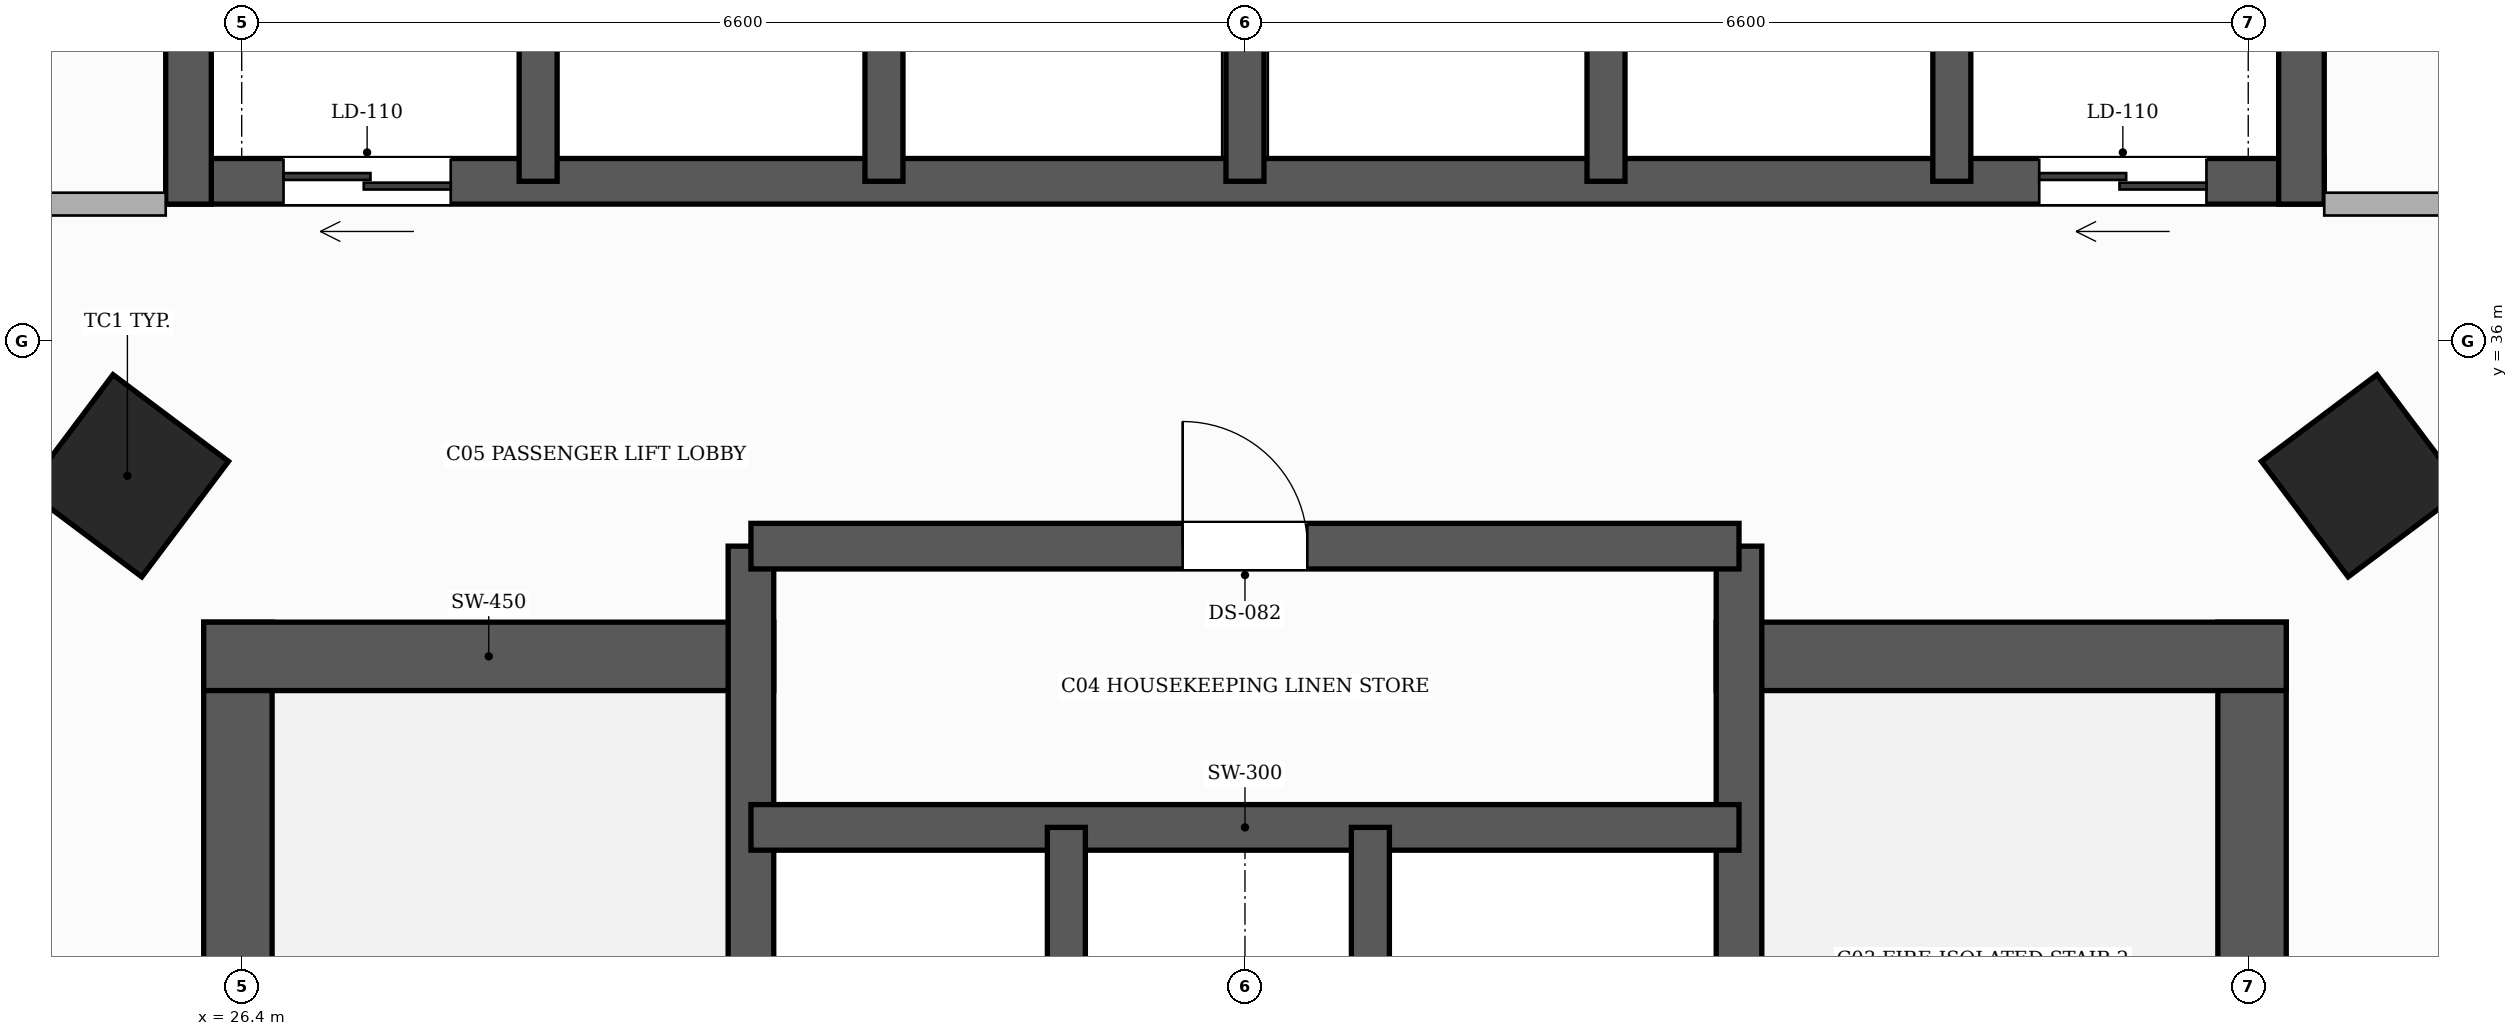
"""IFC4 building model, lengths in metres.
Left out: names, types, materials, properties, quantities, classifications, styles, units other than length and angle.
Written with IfcOpenShell. Run it as: python <this file> out.ifc"""

import sys

from ifc_helpers import new_model, si_unit, direction, frame, frame_2d, origin, origin_2d, place, context, subcontext, project, spatial, rectangle, hollow_rectangle, extrude, element, fill, save


model = new_model("IFC4")
c1 = context("Model", 3, precision=1e-05, world=origin(), true_north=direction((0.0, 1.0)))
c2 = subcontext(c1, "Body", "Model", "MODEL_VIEW")
j1 = project(units=[si_unit("LENGTHUNIT", "METRE"), si_unit("PLANEANGLEUNIT", "RADIAN")], contexts=[c1])
p1 = place(None, origin())
s1 = spatial("IfcSite", under=j1, at=p1, CompositionType="ELEMENT")
p2 = place(p1, origin())
s2 = spatial("IfcBuilding", under=s1, at=p2, CompositionType="ELEMENT")
p3 = place(p2, frame((0.0, 0.0, 23.6)))
s3 = spatial("IfcBuildingStorey", under=s2, at=p3, CompositionType="ELEMENT", Elevation=23.6)
p4 = place(p3, frame((26.375, 26.45, 0.0), z_axis=(0.0, 0.0, 1.0), x_axis=(0.0, 1.0, 0.0)))
e1 = element("IfcWall", 1, at=p4, inside=s3, PredefinedType="SHEAR", context=c2, shape_type="SweptSolid", body=[
    extrude(rectangle(XDim=7.7, YDim=0.45, at=frame_2d((3.85, 0.0))), origin(), (0.0, 0.0, 1.0), 3.3),
])
p5 = place(p3, frame((26.15, 33.925, 0.0), z_axis=(0.0, 0.0, 1.0), x_axis=(1.0, 0.0, 0.0)))
e2 = element("IfcWall", 2, at=p5, inside=s3, PredefinedType="SHEAR", context=c2, shape_type="SweptSolid", body=[
    extrude(rectangle(XDim=3.75, YDim=0.45, at=frame_2d((1.875, 0.0))), origin(), (0.0, 0.0, 1.0), 3.3),
])
p6 = place(p3, frame((39.625, 26.45, 0.0), z_axis=(0.0, 0.0, 1.0), x_axis=(0.0, 1.0, 0.0)))
e3 = element("IfcWall", 3, at=p6, inside=s3, PredefinedType="SHEAR", context=c2, shape_type="SweptSolid", body=[
    extrude(rectangle(XDim=7.7, YDim=0.45, at=frame_2d((3.85, 0.0))), origin(), (0.0, 0.0, 1.0), 3.3),
])
p7 = place(p3, frame((36.1, 33.925, 0.0), z_axis=(0.0, 0.0, 1.0), x_axis=(1.0, 0.0, 0.0)))
e4 = element("IfcWall", 4, at=p7, inside=s3, PredefinedType="SHEAR", context=c2, shape_type="SweptSolid", body=[
    extrude(rectangle(XDim=3.75, YDim=0.45, at=frame_2d((1.875, 0.0))), origin(), (0.0, 0.0, 1.0), 3.3),
])
p8 = place(p3, frame((29.75, 26.45, 0.0), z_axis=(0.0, 0.0, 1.0), x_axis=(0.0, 1.0, 0.0)))
e5 = element("IfcWall", 5, at=p8, inside=s3, PredefinedType="SHEAR", context=c2, shape_type="SweptSolid", body=[
    extrude(rectangle(XDim=8.2, YDim=0.3, at=frame_2d((4.1, 0.0))), origin(), (0.0, 0.0, 1.0), 3.3),
])
p9 = place(p8, frame((0.6, 0.0, 0.0)))
e6 = element("IfcOpeningElement", 6, at=p9, cuts=e5, PredefinedType="OPENING", context=c2, shape_type="SweptSolid", body=[
    extrude(rectangle(XDim=1.05, YDim=2.15, at=frame_2d((0.525, 1.075))), frame((0.0, 0.16, 0.0), z_axis=(0.0, -1.0, 0.0), x_axis=(1.0, 0.0, 0.0)), (0.0, 0.0, 1.0), 0.32),
])
p10 = place(p3, frame((36.25, 26.45, 0.0), z_axis=(0.0, 0.0, 1.0), x_axis=(0.0, 1.0, 0.0)))
e7 = element("IfcWall", 7, at=p10, inside=s3, PredefinedType="SHEAR", context=c2, shape_type="SweptSolid", body=[
    extrude(rectangle(XDim=8.2, YDim=0.3, at=frame_2d((4.1, 0.0))), origin(), (0.0, 0.0, 1.0), 3.3),
])
p11 = place(p10, frame((0.6, 0.0, 0.0)))
e8 = element("IfcOpeningElement", 8, at=p11, cuts=e7, PredefinedType="OPENING", context=c2, shape_type="SweptSolid", body=[
    extrude(rectangle(XDim=1.05, YDim=2.15, at=frame_2d((0.525, 1.075))), frame((0.0, 0.16, 0.0), z_axis=(0.0, -1.0, 0.0), x_axis=(1.0, 0.0, 0.0)), (0.0, 0.0, 1.0), 0.32),
])
p12 = place(p3, frame((29.75, 32.8, 0.0), z_axis=(0.0, 0.0, 1.0), x_axis=(1.0, 0.0, 0.0)))
e9 = element("IfcWall", 9, at=p12, inside=s3, PredefinedType="SHEAR", context=c2, shape_type="SweptSolid", body=[
    extrude(rectangle(XDim=6.5, YDim=0.3, at=frame_2d((3.25, 0.0))), origin(), (0.0, 0.0, 1.0), 3.3),
])
for number, where, z_axis, x_axis in (
    (10, (31.825, 29.9, 0.0), (0.0, 0.0, 1.0), (0.0, 1.0, 0.0)),
    (11, (33.825, 29.9, 0.0), (0.0, 0.0, 1.0), (0.0, 1.0, 0.0)),
):
    element("IfcWall", number, at=place(p3, frame(where, z_axis=z_axis, x_axis=x_axis)), inside=s3, PredefinedType="SHEAR", context=c2, shape_type="SweptSolid", body=[
        extrude(rectangle(XDim=2.9, YDim=0.25, at=frame_2d((1.45, 0.0))), origin(), (0.0, 0.0, 1.0), 3.3),
    ])
p13 = place(p3, frame((29.75, 34.65, 0.0), z_axis=(0.0, 0.0, 1.0), x_axis=(1.0, 0.0, 0.0)))
e12 = element("IfcWall", 12, at=p13, inside=s3, PredefinedType="SHEAR", context=c2, shape_type="SweptSolid", body=[
    extrude(rectangle(XDim=6.5, YDim=0.3, at=frame_2d((3.25, 0.0))), origin(), (0.0, 0.0, 1.0), 3.3),
])
p14 = place(p13, frame((2.84, 0.0, 0.0)))
e13 = element("IfcOpeningElement", 13, at=p14, cuts=e12, PredefinedType="OPENING", context=c2, shape_type="SweptSolid", body=[
    extrude(rectangle(XDim=0.82, YDim=2.1, at=frame_2d((0.41, 1.05))), frame((0.0, 0.16, 0.0), z_axis=(0.0, -1.0, 0.0), x_axis=(1.0, 0.0, 0.0)), (0.0, 0.0, 1.0), 0.32),
])
p15 = place(p3, frame((40.1, 37.05, 0.0), z_axis=(0.0, 0.0, 1.0), x_axis=(-1.0, 0.0, 0.0)))
e14 = element("IfcWall", 14, at=p15, inside=s3, PredefinedType="SHEAR", context=c2, shape_type="SweptSolid", body=[
    extrude(rectangle(XDim=14.2, YDim=0.3, at=frame_2d((7.1, 0.0))), origin(), (0.0, 0.0, 1.0), 3.3),
])
p16 = place(p15, frame((12.325, 0.0, 0.0)))
e15 = element("IfcOpeningElement", 15, at=p16, cuts=e14, PredefinedType="OPENING", context=c2, shape_type="SweptSolid", body=[
    extrude(rectangle(XDim=1.1, YDim=2.2, at=frame_2d((0.55, 1.1))), frame((0.0, 0.16, 0.0), z_axis=(0.0, -1.0, 0.0), x_axis=(1.0, 0.0, 0.0)), (0.0, 0.0, 1.0), 0.32),
])
p17 = place(p15, frame((0.775, 0.0, 0.0)))
e16 = element("IfcOpeningElement", 16, at=p17, cuts=e14, PredefinedType="OPENING", context=c2, shape_type="SweptSolid", body=[
    extrude(rectangle(XDim=1.1, YDim=2.2, at=frame_2d((0.55, 1.1))), frame((0.0, 0.16, 0.0), z_axis=(0.0, -1.0, 0.0), x_axis=(1.0, 0.0, 0.0)), (0.0, 0.0, 1.0), 0.32),
])
for number, where, z_axis, x_axis in (
    (17, (26.05, 36.9, 0.0), (0.0, 0.0, 1.0), (0.0, 1.0, 0.0)),
    (18, (39.95, 36.9, 0.0), (0.0, 0.0, 1.0), (0.0, 1.0, 0.0)),
):
    element("IfcWall", number, at=place(p3, frame(where, z_axis=z_axis, x_axis=x_axis)), inside=s3, PredefinedType="SHEAR", context=c2, shape_type="SweptSolid", body=[
        extrude(rectangle(XDim=2.85, YDim=0.3, at=frame_2d((1.425, 0.0))), origin(), (0.0, 0.0, 1.0), 3.3),
    ])
for number, where, z_axis, x_axis in (
    (19, (28.35, 37.05, 0.0), (0.0, 0.0, 1.0), (0.0, 1.0, 0.0)),
    (20, (30.625, 37.05, 0.0), (0.0, 0.0, 1.0), (0.0, 1.0, 0.0)),
    (21, (33.0, 37.05, 0.0), (0.0, 0.0, 1.0), (0.0, 1.0, 0.0)),
    (22, (35.375, 37.05, 0.0), (0.0, 0.0, 1.0), (0.0, 1.0, 0.0)),
    (23, (37.65, 37.05, 0.0), (0.0, 0.0, 1.0), (0.0, 1.0, 0.0)),
):
    element("IfcWall", number, at=place(p3, frame(where, z_axis=z_axis, x_axis=x_axis)), inside=s3, PredefinedType="SHEAR", context=c2, shape_type="SweptSolid", body=[
        extrude(rectangle(XDim=2.55, YDim=0.25, at=frame_2d((1.275, 0.0))), origin(), (0.0, 0.0, 1.0), 3.3),
    ])
for number, where, z_axis, x_axis in (
    (24, (25.648, 35.113, 0.0), (0.0, 0.0, 1.0), (0.6, 0.8, 0.0)),
    (25, (40.352, 35.113, 0.0), (0.0, 0.0, 1.0), (-0.6, 0.8, 0.0)),
):
    element("IfcColumn", number, at=place(p3, frame(where, z_axis=z_axis, x_axis=x_axis)), inside=s3, PredefinedType="COLUMN", context=c2, shape_type="SweptSolid", body=[
        extrude(hollow_rectangle(XDim=0.95, YDim=0.95, WallThickness=0.032, at=origin_2d()), origin(), (0.0, 0.0, 1.0), 3.3),
    ])
p18 = place(p3, frame((40.1, 36.9, 0.0), z_axis=(0.0, 0.0, 1.0), x_axis=(1.0, 0.0, 0.0)))
e26 = element("IfcWall", 26, at=p18, inside=s3, PredefinedType="PARTITIONING", context=c2, shape_type="SweptSolid", body=[
    extrude(rectangle(XDim=2.55, YDim=0.15, at=frame_2d((1.275, 0.0))), origin(), (0.0, 0.0, 1.0), 2.413),
])
p19 = place(p3, frame((23.41, 36.9, 0.0), z_axis=(0.0, 0.0, 1.0), x_axis=(1.0, 0.0, 0.0)))
e27 = element("IfcWall", 27, at=p19, inside=s3, PredefinedType="PARTITIONING", context=c2, shape_type="SweptSolid", body=[
    extrude(rectangle(XDim=2.49, YDim=0.15, at=frame_2d((1.245, 0.0))), origin(), (0.0, 0.0, 1.0), 2.413),
])
p20 = place(p16, origin())
e28 = element("IfcDoor", 28, at=p20, inside=s3, OperationType="DOUBLE_DOOR_SLIDING", PredefinedType="DOOR", context=c2, shape_type="SweptSolid", body=[
    extrude(rectangle(XDim=1.1, YDim=2.2, at=frame_2d((0.55, 1.1))), frame((0.0, 0.025, 0.0), z_axis=(0.0, -1.0, 0.0), x_axis=(1.0, 0.0, 0.0)), (0.0, 0.0, 1.0), 0.05),
])
fill(e15, e28)
p21 = place(p17, origin())
e29 = element("IfcDoor", 29, at=p21, inside=s3, OperationType="DOUBLE_DOOR_SLIDING", PredefinedType="DOOR", context=c2, shape_type="SweptSolid", body=[
    extrude(rectangle(XDim=1.1, YDim=2.2, at=frame_2d((0.55, 1.1))), frame((0.0, 0.025, 0.0), z_axis=(0.0, -1.0, 0.0), x_axis=(1.0, 0.0, 0.0)), (0.0, 0.0, 1.0), 0.05),
])
fill(e16, e29)
p22 = place(p14, origin())
e30 = element("IfcDoor", 30, at=p22, inside=s3, OperationType="SINGLE_SWING_LEFT", PredefinedType="DOOR", context=c2, shape_type="SweptSolid", body=[
    extrude(rectangle(XDim=0.82, YDim=2.1, at=frame_2d((0.41, 1.05))), frame((0.0, 0.025, 0.0), z_axis=(0.0, -1.0, 0.0), x_axis=(1.0, 0.0, 0.0)), (0.0, 0.0, 1.0), 0.05),
])
fill(e13, e30)
save(model, sys.argv[1])
